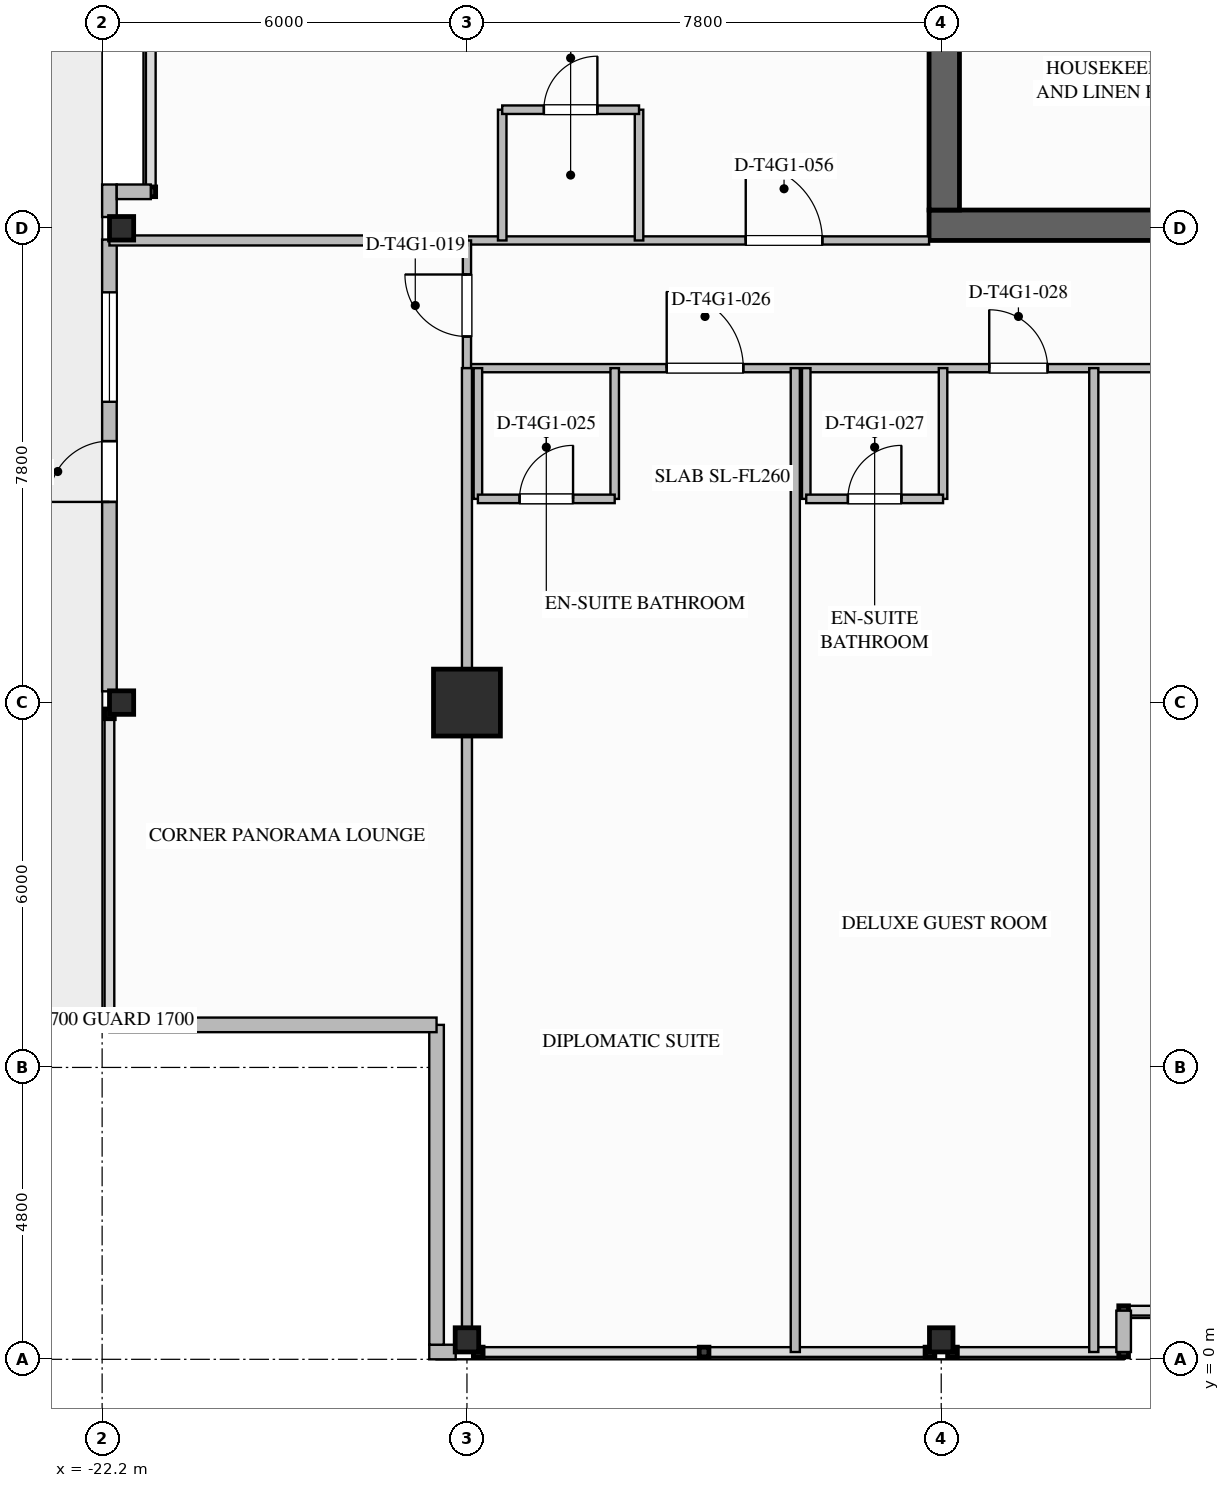
"""IFC4 building model, lengths in metres.
Left out: names, types, materials, properties, quantities, classifications, styles, units other than length and angle.
Written with IfcOpenShell. Run it as: python <this file> out.ifc"""

import sys

from ifc_helpers import new_model, si_unit, direction, frame, frame_2d, origin, origin_2d, place, context, subcontext, project, spatial, rectangle, i_section, extrude, element, fill, save


model = new_model("IFC4")
c1 = context("Model", 3, precision=1e-05, world=origin(), true_north=direction((0.0, 1.0)))
c2 = subcontext(c1, "Body", "Model", "MODEL_VIEW")
j1 = project(units=[si_unit("LENGTHUNIT", "METRE"), si_unit("PLANEANGLEUNIT", "RADIAN")], contexts=[c1])
p1 = place(None, origin())
s1 = spatial("IfcSite", under=j1, at=p1, CompositionType="ELEMENT")
p2 = place(p1, origin())
s2 = spatial("IfcBuilding", under=s1, at=p2, CompositionType="ELEMENT")
p3 = place(p2, frame((0.0, 0.0, 205.1)))
s3 = spatial("IfcBuildingStorey", under=s2, at=p3, CompositionType="ELEMENT", Elevation=205.1)
p4 = place(p3, frame((8.6, 18.65, 0.0), z_axis=(0.0, 0.0, 1.0), x_axis=(-1.0, 0.0, 0.0)))
e1 = element("IfcWall", 1, at=p4, inside=s3, PredefinedType="SHEAR", context=c2, shape_type="SweptSolid", body=[
    extrude(rectangle(XDim=17.2, YDim=0.5, at=frame_2d((8.6, 0.0))), origin(), (0.0, 0.0, 1.0), 3.6),
])
p5 = place(p3, frame((-8.35, 18.9, 0.0), z_axis=(0.0, 0.0, 1.0), x_axis=(0.0, 1.0, 0.0)))
e2 = element("IfcWall", 2, at=p5, inside=s3, PredefinedType="SHEAR", context=c2, shape_type="SweptSolid", body=[
    extrude(rectangle(XDim=16.2, YDim=0.5, at=frame_2d((8.1, 0.0))), origin(), (0.0, 0.0, 1.0), 3.6),
])
p6 = place(p3, frame((-16.2, 10.8, 0.0), z_axis=(0.0, 0.0, 1.0), x_axis=(1.0, 0.0, 0.0)))
e3 = element("IfcColumn", 3, at=p6, inside=s3, PredefinedType="COLUMN", context=c2, shape_type="SweptSolid", body=[
    extrude(rectangle(XDim=1.1, YDim=1.1, at=origin_2d()), origin(), (0.0, 0.0, 1.0), 3.6),
])
for number, where, z_axis, x_axis in (
    (4, (-21.88, 10.8, -0.26), (0.0, 0.0, 1.0), (1.0, 0.0, 0.0)),
    (5, (-21.88, 18.6, -0.26), (0.0, 0.0, 1.0), (1.0, 0.0, 0.0)),
):
    element("IfcColumn", number, at=place(p3, frame(where, z_axis=z_axis, x_axis=x_axis)), inside=s3, PredefinedType="COLUMN", context=c2, shape_type="SweptSolid", body=[
        extrude(i_section(OverallWidth=0.397, OverallDepth=0.387, WebThickness=0.021, FlangeThickness=0.033, FilletRadius=0.025, at=origin_2d()), origin(), (0.0, 0.0, 1.0), 3.857),
    ])
for number, where, z_axis, x_axis in (
    (6, (-16.2, 0.32, 0.0), (0.0, 0.0, 1.0), (0.0, 1.0, 0.0)),
    (7, (-8.4, 0.32, 0.0), (0.0, 0.0, 1.0), (0.0, 1.0, 0.0)),
):
    element("IfcColumn", number, at=place(p3, frame(where, z_axis=z_axis, x_axis=x_axis)), inside=s3, PredefinedType="COLUMN", context=c2, shape_type="SweptSolid", body=[
        extrude(i_section(OverallWidth=0.397, OverallDepth=0.387, WebThickness=0.021, FlangeThickness=0.033, FilletRadius=0.025, at=origin_2d()), origin(), (0.0, 0.0, 1.0), 3.597),
    ])
p7 = place(p3, frame((-22.08, 10.985, 0.0), z_axis=(0.0, 0.0, 1.0), x_axis=(0.0, 1.0, 0.0)))
e8 = element("IfcWall", 8, at=p7, inside=s3, PredefinedType="STANDARD", context=c2, shape_type="SweptSolid", body=[
    extrude(rectangle(XDim=7.429, YDim=0.24, at=frame_2d((3.715, 0.0))), origin(), (0.0, 0.0, 1.0), 2.803),
])
p8 = place(p7, frame((3.115, 0.0, 0.0)))
e9 = element("IfcOpeningElement", 9, at=p8, cuts=e8, PredefinedType="OPENING", context=c2, shape_type="SweptSolid", body=[
    extrude(rectangle(XDim=1.0, YDim=2.2, at=frame_2d((0.5, 1.1))), frame((0.0, 0.13, 0.0), z_axis=(0.0, -1.0, 0.0), x_axis=(1.0, 0.0, 0.0)), (0.0, 0.0, 1.0), 0.26),
])
p9 = place(p7, frame((4.761, 0.0, 0.75)))
e10 = element("IfcOpeningElement", 10, at=p9, cuts=e8, PredefinedType="OPENING", context=c2, shape_type="SweptSolid", body=[
    extrude(rectangle(XDim=1.8, YDim=1.953, at=frame_2d((0.9, 0.977))), frame((0.0, 0.13, 0.0), z_axis=(0.0, -1.0, 0.0), x_axis=(1.0, 0.0, 0.0)), (0.0, 0.0, 1.0), 0.26),
])
p10 = place(p3, frame((-22.08, 18.785, 0.0), z_axis=(0.0, 0.0, 1.0), x_axis=(0.0, 1.0, 0.0)))
e11 = element("IfcWall", 11, at=p10, inside=s3, PredefinedType="STANDARD", context=c2, shape_type="SweptSolid", body=[
    extrude(rectangle(XDim=0.535, YDim=0.24, at=frame_2d((0.267, 0.0))), origin(), (0.0, 0.0, 1.0), 3.34),
])
p11 = place(p3, frame((-16.385, 0.12, 0.0), z_axis=(0.0, 0.0, 1.0), x_axis=(-1.0, 0.0, 0.0)))
e12 = element("IfcWall", 12, at=p11, inside=s3, PredefinedType="STANDARD", context=c2, shape_type="SweptSolid", body=[
    extrude(rectangle(XDim=0.435, YDim=0.24, at=frame_2d((0.217, 0.0))), origin(), (0.0, 0.0, 1.0), 3.34),
])
p12 = place(p3, frame((-16.7, 0.24, 0.0), z_axis=(0.0, 0.0, 1.0), x_axis=(0.0, 1.0, 0.0)))
e13 = element("IfcWall", 13, at=p12, inside=s3, PredefinedType="STANDARD", context=c2, shape_type="SweptSolid", body=[
    extrude(rectangle(XDim=5.26, YDim=0.24, at=frame_2d((2.63, 0.0))), origin(), (0.0, 0.0, 1.0), 3.34),
])
p13 = place(p3, frame((-16.7, 5.5, 0.0), z_axis=(0.0, 0.0, 1.0), x_axis=(-1.0, 0.0, 0.0)))
e14 = element("IfcWall", 14, at=p13, inside=s3, PredefinedType="STANDARD", context=c2, shape_type="SweptSolid", body=[
    extrude(rectangle(XDim=5.38, YDim=0.24, at=frame_2d((2.69, 0.0))), origin(), (0.0, 0.0, 1.0), 3.34),
])
p14 = place(p3, frame((-21.96, 19.2, 0.0), z_axis=(0.0, 0.0, 1.0), x_axis=(1.0, 0.0, 0.0)))
e15 = element("IfcWall", 15, at=p14, inside=s3, PredefinedType="STANDARD", context=c2, shape_type="SweptSolid", body=[
    extrude(rectangle(XDim=0.56, YDim=0.24, at=frame_2d((0.28, 0.0))), origin(), (0.0, 0.0, 1.0), 3.34),
])
p15 = place(p3, frame((-5.4, 0.8, 0.0), z_axis=(0.0, 0.0, 1.0), x_axis=(0.0, -1.0, 0.0)))
e16 = element("IfcWall", 16, at=p15, inside=s3, PredefinedType="STANDARD", context=c2, shape_type="SweptSolid", body=[
    extrude(rectangle(XDim=0.68, YDim=0.24, at=frame_2d((0.34, 0.0))), origin(), (0.0, 0.0, 1.0), 3.34),
])
p16 = place(p3, frame((-16.2, 16.3, 0.0), z_axis=(0.0, 0.0, 1.0), x_axis=(1.0, 0.0, 0.0)))
e17 = element("IfcWall", 17, at=p16, inside=s3, PredefinedType="PARTITIONING", context=c2, shape_type="SweptSolid", body=[
    extrude(rectangle(XDim=38.28, YDim=0.135, at=frame_2d((19.14, 0.0))), origin(), (0.0, 0.0, 1.0), 3.34),
])
p17 = place(p16, frame((35.785, 0.0, 0.0)))
e18 = element("IfcOpeningElement", 18, at=p17, cuts=e17, PredefinedType="OPENING", context=c2, shape_type="SweptSolid", body=[
    extrude(rectangle(XDim=1.26, YDim=2.2, at=frame_2d((0.63, 1.1))), frame((0.0, 0.077, 0.0), z_axis=(0.0, -1.0, 0.0), x_axis=(1.0, 0.0, 0.0)), (0.0, 0.0, 1.0), 0.155),
])
p18 = place(p16, frame((3.285, 0.0, 0.0)))
e19 = element("IfcOpeningElement", 19, at=p18, cuts=e17, PredefinedType="OPENING", context=c2, shape_type="SweptSolid", body=[
    extrude(rectangle(XDim=1.26, YDim=2.2, at=frame_2d((0.63, 1.1))), frame((0.0, 0.077, 0.0), z_axis=(0.0, -1.0, 0.0), x_axis=(1.0, 0.0, 0.0)), (0.0, 0.0, 1.0), 0.155),
])
p19 = place(p16, frame((8.59, 0.0, 0.0)))
e20 = element("IfcOpeningElement", 20, at=p19, cuts=e17, PredefinedType="OPENING", context=c2, shape_type="SweptSolid", body=[
    extrude(rectangle(XDim=0.96, YDim=2.15, at=frame_2d((0.48, 1.075))), frame((0.0, 0.077, 0.0), z_axis=(0.0, -1.0, 0.0), x_axis=(1.0, 0.0, 0.0)), (0.0, 0.0, 1.0), 0.155),
])
p20 = place(p16, frame((12.744, 0.0, 0.0)))
e21 = element("IfcOpeningElement", 21, at=p20, cuts=e17, PredefinedType="OPENING", context=c2, shape_type="SweptSolid", body=[
    extrude(rectangle(XDim=1.02, YDim=2.15, at=frame_2d((0.51, 1.075))), frame((0.0, 0.077, 0.0), z_axis=(0.0, -1.0, 0.0), x_axis=(1.0, 0.0, 0.0)), (0.0, 0.0, 1.0), 0.155),
])
p21 = place(p16, frame((19.73, 0.0, 0.0)))
e22 = element("IfcOpeningElement", 22, at=p21, cuts=e17, PredefinedType="OPENING", context=c2, shape_type="SweptSolid", body=[
    extrude(rectangle(XDim=1.26, YDim=2.2, at=frame_2d((0.63, 1.1))), frame((0.0, 0.077, 0.0), z_axis=(0.0, -1.0, 0.0), x_axis=(1.0, 0.0, 0.0)), (0.0, 0.0, 1.0), 0.155),
])
p22 = place(p16, frame((25.281, 0.0, 0.0)))
e23 = element("IfcOpeningElement", 23, at=p22, cuts=e17, PredefinedType="OPENING", context=c2, shape_type="SweptSolid", body=[
    extrude(rectangle(XDim=0.96, YDim=2.15, at=frame_2d((0.48, 1.075))), frame((0.0, 0.077, 0.0), z_axis=(0.0, -1.0, 0.0), x_axis=(1.0, 0.0, 0.0)), (0.0, 0.0, 1.0), 0.155),
])
p23 = place(p16, frame((30.285, 0.0, 0.0)))
e24 = element("IfcOpeningElement", 24, at=p23, cuts=e17, PredefinedType="OPENING", context=c2, shape_type="SweptSolid", body=[
    extrude(rectangle(XDim=1.26, YDim=2.2, at=frame_2d((0.63, 1.1))), frame((0.0, 0.077, 0.0), z_axis=(0.0, -1.0, 0.0), x_axis=(1.0, 0.0, 0.0)), (0.0, 0.0, 1.0), 0.155),
])
p24 = place(p3, frame((-16.2, 18.4, 0.0), z_axis=(0.0, 0.0, 1.0), x_axis=(1.0, 0.0, 0.0)))
e25 = element("IfcWall", 25, at=p24, inside=s3, PredefinedType="PARTITIONING", context=c2, shape_type="SweptSolid", body=[
    extrude(rectangle(XDim=7.6, YDim=0.135, at=frame_2d((3.8, 0.0))), origin(), (0.0, 0.0, 1.0), 2.717),
])
p25 = place(p24, frame((4.585, 0.0, 0.0)))
e26 = element("IfcOpeningElement", 26, at=p25, cuts=e25, PredefinedType="OPENING", context=c2, shape_type="SweptSolid", body=[
    extrude(rectangle(XDim=1.26, YDim=2.2, at=frame_2d((0.63, 1.1))), frame((0.0, 0.077, 0.0), z_axis=(0.0, -1.0, 0.0), x_axis=(1.0, 0.0, 0.0)), (0.0, 0.0, 1.0), 0.155),
])
p26 = place(p3, frame((-16.2, 16.3, 0.0), z_axis=(0.0, 0.0, 1.0), x_axis=(0.0, 1.0, 0.0)))
e27 = element("IfcWall", 27, at=p26, inside=s3, PredefinedType="PARTITIONING", context=c2, shape_type="SweptSolid", body=[
    extrude(rectangle(XDim=2.1, YDim=0.135, at=frame_2d((1.05, 0.0))), origin(), (0.0, 0.0, 1.0), 2.714),
])
p27 = place(p26, frame((0.52, 0.0, 0.0)))
e28 = element("IfcOpeningElement", 28, at=p27, cuts=e27, PredefinedType="OPENING", context=c2, shape_type="SweptSolid", body=[
    extrude(rectangle(XDim=1.02, YDim=2.15, at=frame_2d((0.51, 1.075))), frame((0.0, 0.077, 0.0), z_axis=(0.0, -1.0, 0.0), x_axis=(1.0, 0.0, 0.0)), (0.0, 0.0, 1.0), 0.155),
])
p28 = place(p3, frame((-16.2, 0.12, 0.0), z_axis=(0.0, 0.0, 1.0), x_axis=(0.0, 1.0, 0.0)))
e29 = element("IfcWall", 29, at=p28, inside=s3, PredefinedType="PARTITIONING", context=c2, shape_type="SweptSolid", body=[
    extrude(rectangle(XDim=16.18, YDim=0.165, at=frame_2d((8.09, 0.0))), origin(), (0.0, 0.0, 1.0), 2.714),
])
p29 = place(p3, frame((-22.08, 18.4, 0.0), z_axis=(0.0, 0.0, 1.0), x_axis=(1.0, 0.0, 0.0)))
e30 = element("IfcWall", 30, at=p29, inside=s3, PredefinedType="PARTITIONING", context=c2, shape_type="SweptSolid", body=[
    extrude(rectangle(XDim=5.88, YDim=0.165, at=frame_2d((2.94, 0.0))), origin(), (0.0, 0.0, 1.0), 2.714),
])
p30 = place(p3, frame((-16.02, 16.3, 0.0), z_axis=(0.0, 0.0, 1.0), x_axis=(0.0, -1.0, 0.0)))
e31 = element("IfcWall", 31, at=p30, inside=s3, PredefinedType="PLUMBINGWALL", context=c2, shape_type="SweptSolid", body=[
    extrude(rectangle(XDim=2.15, YDim=0.14, at=frame_2d((1.075, 0.0))), origin(), (0.0, 0.0, 1.0), 2.714),
])
p31 = place(p3, frame((-13.77, 16.3, 0.0), z_axis=(0.0, 0.0, 1.0), x_axis=(0.0, -1.0, 0.0)))
e32 = element("IfcWall", 32, at=p31, inside=s3, PredefinedType="PLUMBINGWALL", context=c2, shape_type="SweptSolid", body=[
    extrude(rectangle(XDim=2.15, YDim=0.14, at=frame_2d((1.075, 0.0))), origin(), (0.0, 0.0, 1.0), 3.34),
])
p32 = place(p3, frame((-16.02, 14.15, 0.0), z_axis=(0.0, 0.0, 1.0), x_axis=(1.0, 0.0, 0.0)))
e33 = element("IfcWall", 33, at=p32, inside=s3, PredefinedType="PLUMBINGWALL", context=c2, shape_type="SweptSolid", body=[
    extrude(rectangle(XDim=2.25, YDim=0.14, at=frame_2d((1.125, 0.0))), origin(), (0.0, 0.0, 1.0), 3.34),
])
p33 = place(p32, frame((0.685, 0.0, 0.0)))
e34 = element("IfcOpeningElement", 34, at=p33, cuts=e33, PredefinedType="OPENING", context=c2, shape_type="SweptSolid", body=[
    extrude(rectangle(XDim=0.88, YDim=2.1, at=frame_2d((0.44, 1.05))), frame((0.0, 0.08, 0.0), z_axis=(0.0, -1.0, 0.0), x_axis=(1.0, 0.0, 0.0)), (0.0, 0.0, 1.0), 0.16),
])
p34 = place(p3, frame((-10.8, 0.12, 0.0), z_axis=(0.0, 0.0, 1.0), x_axis=(0.0, 1.0, 0.0)))
e35 = element("IfcWall", 35, at=p34, inside=s3, PredefinedType="PARTITIONING", context=c2, shape_type="SweptSolid", body=[
    extrude(rectangle(XDim=16.18, YDim=0.15, at=frame_2d((8.09, 0.0))), origin(), (0.0, 0.0, 1.0), 3.34),
])
p35 = place(p3, frame((-10.62, 16.3, 0.0), z_axis=(0.0, 0.0, 1.0), x_axis=(0.0, -1.0, 0.0)))
e36 = element("IfcWall", 36, at=p35, inside=s3, PredefinedType="PLUMBINGWALL", context=c2, shape_type="SweptSolid", body=[
    extrude(rectangle(XDim=2.15, YDim=0.14, at=frame_2d((1.075, 0.0))), origin(), (0.0, 0.0, 1.0), 3.34),
])
p36 = place(p3, frame((-8.37, 16.3, 0.0), z_axis=(0.0, 0.0, 1.0), x_axis=(0.0, -1.0, 0.0)))
e37 = element("IfcWall", 37, at=p36, inside=s3, PredefinedType="PLUMBINGWALL", context=c2, shape_type="SweptSolid", body=[
    extrude(rectangle(XDim=2.15, YDim=0.14, at=frame_2d((1.075, 0.0))), origin(), (0.0, 0.0, 1.0), 2.717),
])
p37 = place(p3, frame((-10.62, 14.15, 0.0), z_axis=(0.0, 0.0, 1.0), x_axis=(1.0, 0.0, 0.0)))
e38 = element("IfcWall", 38, at=p37, inside=s3, PredefinedType="PLUMBINGWALL", context=c2, shape_type="SweptSolid", body=[
    extrude(rectangle(XDim=2.25, YDim=0.14, at=frame_2d((1.125, 0.0))), origin(), (0.0, 0.0, 1.0), 3.34),
])
p38 = place(p37, frame((0.685, 0.0, 0.0)))
e39 = element("IfcOpeningElement", 39, at=p38, cuts=e38, PredefinedType="OPENING", context=c2, shape_type="SweptSolid", body=[
    extrude(rectangle(XDim=0.88, YDim=2.1, at=frame_2d((0.44, 1.05))), frame((0.0, 0.08, 0.0), z_axis=(0.0, -1.0, 0.0), x_axis=(1.0, 0.0, 0.0)), (0.0, 0.0, 1.0), 0.16),
])
p39 = place(p3, frame((-5.891, 0.12, 0.0), z_axis=(0.0, 0.0, 1.0), x_axis=(0.0, 1.0, 0.0)))
e40 = element("IfcWall", 40, at=p39, inside=s3, PredefinedType="PARTITIONING", context=c2, shape_type="SweptSolid", body=[
    extrude(rectangle(XDim=16.18, YDim=0.15, at=frame_2d((8.09, 0.0))), origin(), (0.0, 0.0, 1.0), 3.34),
])
for number, where, z_axis, x_axis in (
    (41, (-15.62, 18.4, 0.0), (0.0, 0.0, 1.0), (0.0, 1.0, 0.0)),
    (42, (-13.37, 18.4, 0.0), (0.0, 0.0, 1.0), (0.0, 1.0, 0.0)),
):
    element("IfcWall", number, at=place(p3, frame(where, z_axis=z_axis, x_axis=x_axis)), inside=s3, PredefinedType="PLUMBINGWALL", context=c2, shape_type="SweptSolid", body=[
        extrude(rectangle(XDim=2.15, YDim=0.14, at=frame_2d((1.075, 0.0))), origin(), (0.0, 0.0, 1.0), 3.34),
    ])
p40 = place(p3, frame((-15.62, 20.55, 0.0), z_axis=(0.0, 0.0, 1.0), x_axis=(1.0, 0.0, 0.0)))
e43 = element("IfcWall", 43, at=p40, inside=s3, PredefinedType="PLUMBINGWALL", context=c2, shape_type="SweptSolid", body=[
    extrude(rectangle(XDim=2.25, YDim=0.14, at=frame_2d((1.125, 0.0))), origin(), (0.0, 0.0, 1.0), 3.34),
])
p41 = place(p40, frame((0.685, 0.0, 0.0)))
e44 = element("IfcOpeningElement", 44, at=p41, cuts=e43, PredefinedType="OPENING", context=c2, shape_type="SweptSolid", body=[
    extrude(rectangle(XDim=0.88, YDim=2.1, at=frame_2d((0.44, 1.05))), frame((0.0, 0.08, 0.0), z_axis=(0.0, -1.0, 0.0), x_axis=(1.0, 0.0, 0.0)), (0.0, 0.0, 1.0), 0.16),
])
p42 = place(p8, origin())
e45 = element("IfcDoor", 45, at=p42, inside=s3, OperationType="SINGLE_SWING_LEFT", PredefinedType="DOOR", context=c2, shape_type="SweptSolid", body=[
    extrude(rectangle(XDim=1.0, YDim=2.2, at=frame_2d((0.5, 1.1))), frame((0.0, 0.025, 0.0), z_axis=(0.0, -1.0, 0.0), x_axis=(1.0, 0.0, 0.0)), (0.0, 0.0, 1.0), 0.05),
])
fill(e9, e45)
p43 = place(p9, origin())
e46 = element("IfcWindow", 46, at=p43, inside=s3, PartitioningType="SINGLE_PANEL", PredefinedType="WINDOW", context=c2, shape_type="SweptSolid", body=[
    extrude(rectangle(XDim=1.8, YDim=1.953, at=frame_2d((0.9, 0.977))), frame((0.0, 0.03, 0.0), z_axis=(0.0, -1.0, 0.0), x_axis=(1.0, 0.0, 0.0)), (0.0, 0.0, 1.0), 0.06),
])
fill(e10, e46)
p44 = place(p27, origin())
e47 = element("IfcDoor", 47, at=p44, inside=s3, OperationType="SINGLE_SWING_RIGHT", PredefinedType="DOOR", context=c2, shape_type="SweptSolid", body=[
    extrude(rectangle(XDim=1.02, YDim=2.15, at=frame_2d((0.51, 1.075))), frame((0.0, 0.025, 0.0), z_axis=(0.0, -1.0, 0.0), x_axis=(1.0, 0.0, 0.0)), (0.0, 0.0, 1.0), 0.05),
])
fill(e28, e47)
p45 = place(p33, origin())
e48 = element("IfcDoor", 48, at=p45, inside=s3, OperationType="SINGLE_SWING_RIGHT", PredefinedType="DOOR", context=c2, shape_type="SweptSolid", body=[
    extrude(rectangle(XDim=0.88, YDim=2.1, at=frame_2d((0.44, 1.05))), frame((0.0, 0.025, 0.0), z_axis=(0.0, -1.0, 0.0), x_axis=(1.0, 0.0, 0.0)), (0.0, 0.0, 1.0), 0.05),
])
fill(e34, e48)
p46 = place(p18, origin())
e49 = element("IfcDoor", 49, at=p46, inside=s3, OperationType="SINGLE_SWING_LEFT", PredefinedType="DOOR", context=c2, shape_type="SweptSolid", body=[
    extrude(rectangle(XDim=1.26, YDim=2.2, at=frame_2d((0.63, 1.1))), frame((0.0, 0.025, 0.0), z_axis=(0.0, -1.0, 0.0), x_axis=(1.0, 0.0, 0.0)), (0.0, 0.0, 1.0), 0.05),
])
fill(e19, e49)
p47 = place(p38, origin())
e50 = element("IfcDoor", 50, at=p47, inside=s3, OperationType="SINGLE_SWING_RIGHT", PredefinedType="DOOR", context=c2, shape_type="SweptSolid", body=[
    extrude(rectangle(XDim=0.88, YDim=2.1, at=frame_2d((0.44, 1.05))), frame((0.0, 0.025, 0.0), z_axis=(0.0, -1.0, 0.0), x_axis=(1.0, 0.0, 0.0)), (0.0, 0.0, 1.0), 0.05),
])
fill(e39, e50)
p48 = place(p19, origin())
e51 = element("IfcDoor", 51, at=p48, inside=s3, OperationType="SINGLE_SWING_LEFT", PredefinedType="DOOR", context=c2, shape_type="SweptSolid", body=[
    extrude(rectangle(XDim=0.96, YDim=2.15, at=frame_2d((0.48, 1.075))), frame((0.0, 0.025, 0.0), z_axis=(0.0, -1.0, 0.0), x_axis=(1.0, 0.0, 0.0)), (0.0, 0.0, 1.0), 0.05),
])
fill(e20, e51)
p49 = place(p41, origin())
e52 = element("IfcDoor", 52, at=p49, inside=s3, OperationType="SINGLE_SWING_RIGHT", PredefinedType="DOOR", context=c2, shape_type="SweptSolid", body=[
    extrude(rectangle(XDim=0.88, YDim=2.1, at=frame_2d((0.44, 1.05))), frame((0.0, 0.025, 0.0), z_axis=(0.0, -1.0, 0.0), x_axis=(1.0, 0.0, 0.0)), (0.0, 0.0, 1.0), 0.05),
])
fill(e44, e52)
p50 = place(p25, origin())
e53 = element("IfcDoor", 53, at=p50, inside=s3, OperationType="SINGLE_SWING_LEFT", PredefinedType="DOOR", context=c2, shape_type="SweptSolid", body=[
    extrude(rectangle(XDim=1.26, YDim=2.2, at=frame_2d((0.63, 1.1))), frame((0.0, 0.025, 0.0), z_axis=(0.0, -1.0, 0.0), x_axis=(1.0, 0.0, 0.0)), (0.0, 0.0, 1.0), 0.05),
])
fill(e26, e53)
save(model, sys.argv[1])
